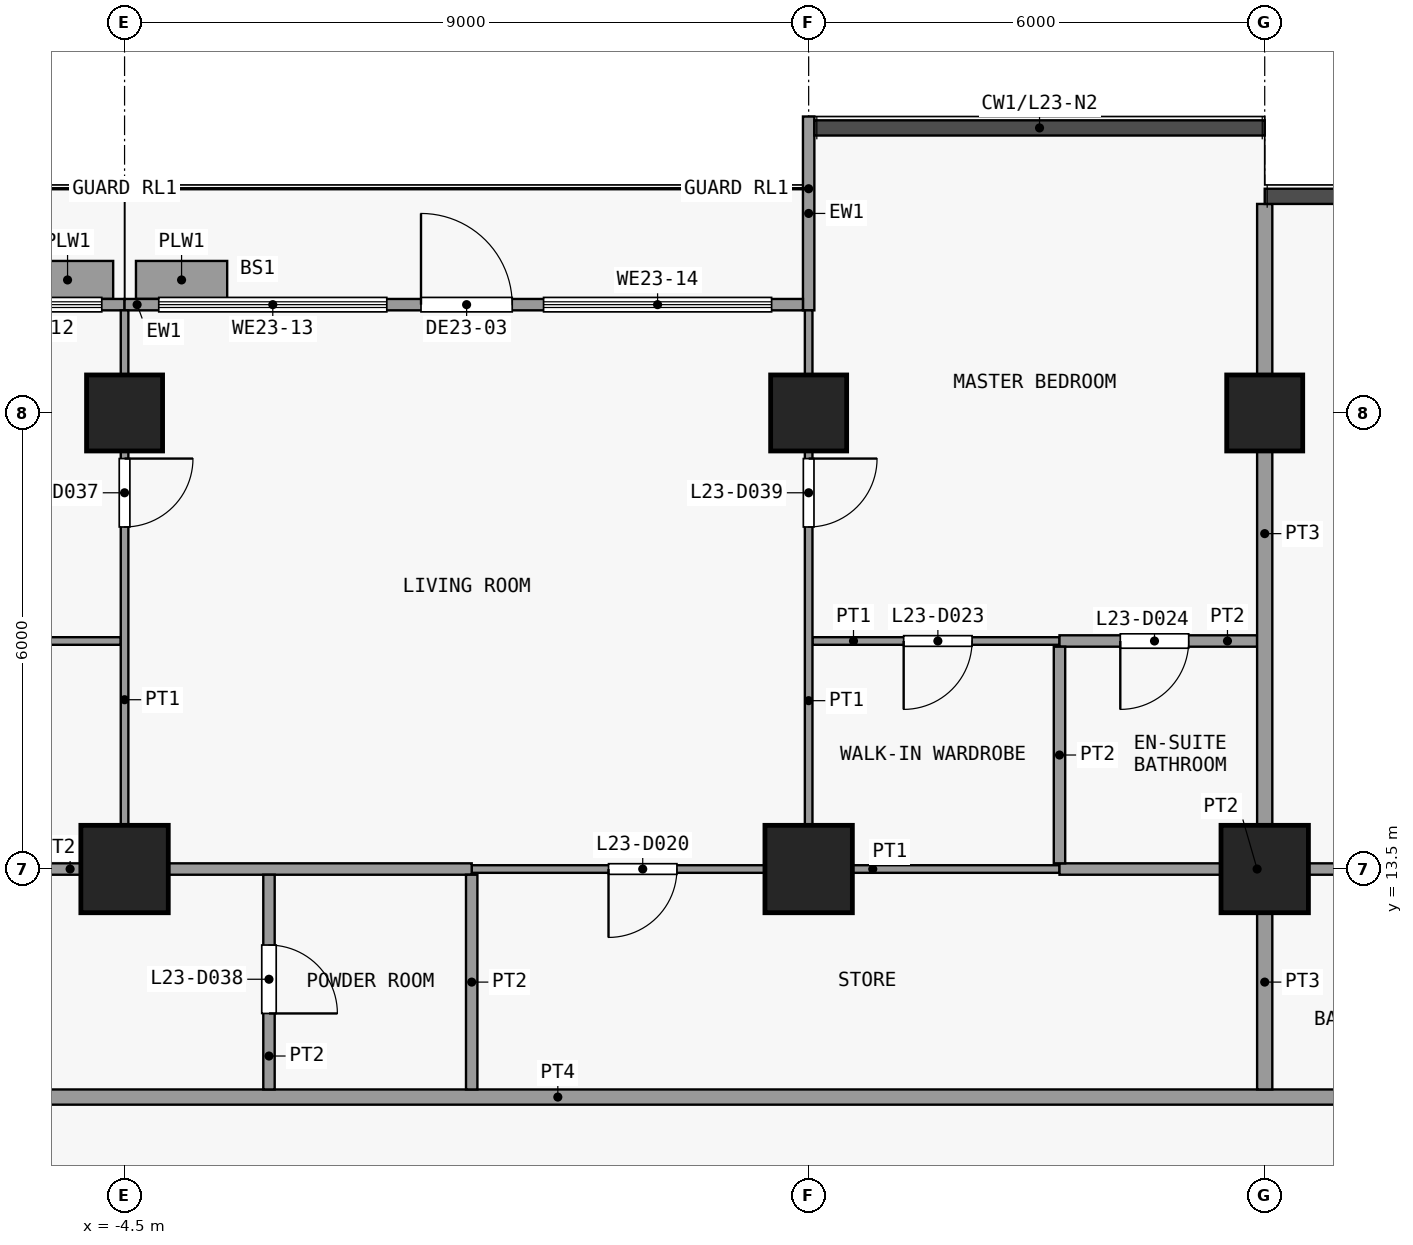
"""IFC4 building model, lengths in metres.
Left out: names, types, materials, properties, quantities, classifications, styles, units other than length and angle.
Written with IfcOpenShell. Run it as: python <this file> out.ifc"""

import sys

from ifc_helpers import new_model, si_unit, direction, frame, frame_2d, origin, origin_2d, place, context, subcontext, project, spatial, rectangle, extrude, element, fill, save


model = new_model("IFC4")
c1 = context("Model", 3, precision=1e-05, world=origin(), true_north=direction((0.0, 1.0)))
c2 = subcontext(c1, "Body", "Model", "MODEL_VIEW")
j1 = project(units=[si_unit("LENGTHUNIT", "METRE"), si_unit("PLANEANGLEUNIT", "RADIAN")], contexts=[c1])
p1 = place(None, origin())
s1 = spatial("IfcSite", under=j1, at=p1, CompositionType="ELEMENT")
p2 = place(p1, origin())
s2 = spatial("IfcBuilding", under=s1, at=p2, CompositionType="ELEMENT")
p3 = place(p2, frame((0.0, 0.0, 95.5)))
s3 = spatial("IfcBuildingStorey", under=s2, at=p3, CompositionType="ELEMENT", Elevation=95.5)
p4 = place(p3, frame((-4.5, 13.5, 0.0), z_axis=(0.0, 0.0, 1.0), x_axis=(1.0, 0.0, 0.0)))
e1 = element("IfcColumn", 1, at=p4, inside=s3, PredefinedType="COLUMN", context=c2, shape_type="SweptSolid", body=[
    extrude(rectangle(XDim=1.15, YDim=1.15, at=origin_2d()), origin(), (0.0, 0.0, 1.0), 3.6),
])
p5 = place(p3, frame((-4.5, 19.5, 0.0), z_axis=(0.0, 0.0, 1.0), x_axis=(1.0, 0.0, 0.0)))
e2 = element("IfcColumn", 2, at=p5, inside=s3, PredefinedType="COLUMN", context=c2, shape_type="SweptSolid", body=[
    extrude(rectangle(XDim=1.0, YDim=1.0, at=origin_2d()), origin(), (0.0, 0.0, 1.0), 3.6),
])
p6 = place(p3, frame((4.5, 13.5, 0.0), z_axis=(0.0, 0.0, 1.0), x_axis=(1.0, 0.0, 0.0)))
e3 = element("IfcColumn", 3, at=p6, inside=s3, PredefinedType="COLUMN", context=c2, shape_type="SweptSolid", body=[
    extrude(rectangle(XDim=1.15, YDim=1.15, at=origin_2d()), origin(), (0.0, 0.0, 1.0), 3.6),
])
p7 = place(p3, frame((4.5, 19.5, 0.0), z_axis=(0.0, 0.0, 1.0), x_axis=(1.0, 0.0, 0.0)))
e4 = element("IfcColumn", 4, at=p7, inside=s3, PredefinedType="COLUMN", context=c2, shape_type="SweptSolid", body=[
    extrude(rectangle(XDim=1.0, YDim=1.0, at=origin_2d()), origin(), (0.0, 0.0, 1.0), 3.6),
])
p8 = place(p3, frame((10.5, 13.5, 0.0), z_axis=(0.0, 0.0, 1.0), x_axis=(1.0, 0.0, 0.0)))
e5 = element("IfcColumn", 5, at=p8, inside=s3, PredefinedType="COLUMN", context=c2, shape_type="SweptSolid", body=[
    extrude(rectangle(XDim=1.15, YDim=1.15, at=origin_2d()), origin(), (0.0, 0.0, 1.0), 3.6),
])
p9 = place(p3, frame((10.5, 19.5, 0.0), z_axis=(0.0, 0.0, 1.0), x_axis=(1.0, 0.0, 0.0)))
e6 = element("IfcColumn", 6, at=p9, inside=s3, PredefinedType="COLUMN", context=c2, shape_type="SweptSolid", body=[
    extrude(rectangle(XDim=1.0, YDim=1.0, at=origin_2d()), origin(), (0.0, 0.0, 1.0), 3.6),
])
p10 = place(p3, frame((-10.5, 20.925, 0.0), z_axis=(0.0, 0.0, 1.0), x_axis=(1.0, 0.0, 0.0)))
e7 = element("IfcWall", 7, at=p10, inside=s3, PredefinedType="SOLIDWALL", context=c2, shape_type="SweptSolid", body=[
    extrude(rectangle(XDim=6.0, YDim=0.15, at=frame_2d((3.0, 0.0))), origin(), (0.0, 0.0, 1.0), 3.3),
])
p11 = place(p10, frame((2.4, 0.0, 0.0)))
e8 = element("IfcOpeningElement", 8, at=p11, cuts=e7, PredefinedType="OPENING", context=c2, shape_type="SweptSolid", body=[
    extrude(rectangle(XDim=1.2, YDim=2.4, at=frame_2d((0.6, 1.2))), frame((0.0, 0.085, 0.0), z_axis=(0.0, -1.0, 0.0), x_axis=(1.0, 0.0, 0.0)), (0.0, 0.0, 1.0), 0.17),
])
p12 = place(p10, frame((0.3, 0.0, 0.9)))
e9 = element("IfcOpeningElement", 9, at=p12, cuts=e7, PredefinedType="OPENING", context=c2, shape_type="SweptSolid", body=[
    extrude(rectangle(XDim=1.8, YDim=2.1, at=frame_2d((0.9, 1.05))), frame((0.0, 0.085, 0.0), z_axis=(0.0, -1.0, 0.0), x_axis=(1.0, 0.0, 0.0)), (0.0, 0.0, 1.0), 0.17),
])
p13 = place(p10, frame((3.9, 0.0, 0.9)))
e10 = element("IfcOpeningElement", 10, at=p13, cuts=e7, PredefinedType="OPENING", context=c2, shape_type="SweptSolid", body=[
    extrude(rectangle(XDim=1.8, YDim=2.1, at=frame_2d((0.9, 1.05))), frame((0.0, 0.085, 0.0), z_axis=(0.0, -1.0, 0.0), x_axis=(1.0, 0.0, 0.0)), (0.0, 0.0, 1.0), 0.17),
])
p14 = place(p3, frame((-5.85, 21.25, 0.0), z_axis=(0.0, 0.0, 1.0), x_axis=(1.0, 0.0, 0.0)))
e11 = element("IfcWall", 11, at=p14, inside=s3, PredefinedType="USERDEFINED", context=c2, shape_type="SweptSolid", body=[
    extrude(rectangle(XDim=1.2, YDim=0.5, at=frame_2d((0.6, 0.0))), origin(), (0.0, 0.0, 1.0), 0.9),
])
p15 = place(p3, frame((4.5, 20.85, 0.0), z_axis=(0.0, 0.0, 1.0), x_axis=(0.0, 1.0, 0.0)))
e12 = element("IfcWall", 12, at=p15, inside=s3, PredefinedType="SOLIDWALL", context=c2, shape_type="SweptSolid", body=[
    extrude(rectangle(XDim=2.55, YDim=0.15, at=frame_2d((1.275, 0.0))), origin(), (0.0, 0.0, 1.0), 3.3),
])
p16 = place(p3, frame((-4.5, 20.925, 0.0), z_axis=(0.0, 0.0, 1.0), x_axis=(1.0, 0.0, 0.0)))
e13 = element("IfcWall", 13, at=p16, inside=s3, PredefinedType="SOLIDWALL", context=c2, shape_type="SweptSolid", body=[
    extrude(rectangle(XDim=8.925, YDim=0.15, at=frame_2d((4.462, 0.0))), origin(), (0.0, 0.0, 1.0), 3.3),
])
p17 = place(p16, frame((3.9, 0.0, 0.0)))
e14 = element("IfcOpeningElement", 14, at=p17, cuts=e13, PredefinedType="OPENING", context=c2, shape_type="SweptSolid", body=[
    extrude(rectangle(XDim=1.2, YDim=2.4, at=frame_2d((0.6, 1.2))), frame((0.0, 0.085, 0.0), z_axis=(0.0, -1.0, 0.0), x_axis=(1.0, 0.0, 0.0)), (0.0, 0.0, 1.0), 0.17),
])
p18 = place(p16, frame((0.45, 0.0, 0.9)))
e15 = element("IfcOpeningElement", 15, at=p18, cuts=e13, PredefinedType="OPENING", context=c2, shape_type="SweptSolid", body=[
    extrude(rectangle(XDim=3.0, YDim=2.1, at=frame_2d((1.5, 1.05))), frame((0.0, 0.085, 0.0), z_axis=(0.0, -1.0, 0.0), x_axis=(1.0, 0.0, 0.0)), (0.0, 0.0, 1.0), 0.17),
])
p19 = place(p16, frame((5.512, 0.0, 0.9)))
e16 = element("IfcOpeningElement", 16, at=p19, cuts=e13, PredefinedType="OPENING", context=c2, shape_type="SweptSolid", body=[
    extrude(rectangle(XDim=3.0, YDim=2.1, at=frame_2d((1.5, 1.05))), frame((0.0, 0.085, 0.0), z_axis=(0.0, -1.0, 0.0), x_axis=(1.0, 0.0, 0.0)), (0.0, 0.0, 1.0), 0.17),
])
p20 = place(p3, frame((-4.35, 21.25, 0.0), z_axis=(0.0, 0.0, 1.0), x_axis=(1.0, 0.0, 0.0)))
e17 = element("IfcWall", 17, at=p20, inside=s3, PredefinedType="USERDEFINED", context=c2, shape_type="SweptSolid", body=[
    extrude(rectangle(XDim=1.2, YDim=0.5, at=frame_2d((0.6, 0.0))), origin(), (0.0, 0.0, 1.0), 0.9),
])
p21 = place(p3, frame((-23.85, 10.5, 0.0), z_axis=(0.0, 0.0, 1.0), x_axis=(1.0, 0.0, 0.0)))
e18 = element("IfcWall", 18, at=p21, inside=s3, PredefinedType="PARTITIONING", context=c2, shape_type="SweptSolid", body=[
    extrude(rectangle(XDim=47.7, YDim=0.2, at=frame_2d((23.85, 0.0))), origin(), (0.0, 0.0, 1.0), 3.3),
])
p22 = place(p21, frame((3.05, 0.0, 0.0)))
e19 = element("IfcOpeningElement", 19, at=p22, cuts=e18, PredefinedType="OPENING", context=c2, shape_type="SweptSolid", body=[
    extrude(rectangle(XDim=1.0, YDim=2.1, at=frame_2d((0.5, 1.05))), frame((0.0, 0.11, 0.0), z_axis=(0.0, -1.0, 0.0), x_axis=(1.0, 0.0, 0.0)), (0.0, 0.0, 1.0), 0.22),
])
p23 = place(p21, frame((11.55, 0.0, 0.0)))
e20 = element("IfcOpeningElement", 20, at=p23, cuts=e18, PredefinedType="OPENING", context=c2, shape_type="SweptSolid", body=[
    extrude(rectangle(XDim=1.0, YDim=2.1, at=frame_2d((0.5, 1.05))), frame((0.0, 0.11, 0.0), z_axis=(0.0, -1.0, 0.0), x_axis=(1.0, 0.0, 0.0)), (0.0, 0.0, 1.0), 0.22),
])
p24 = place(p21, frame((37.55, 0.0, 0.0)))
e21 = element("IfcOpeningElement", 21, at=p24, cuts=e18, PredefinedType="OPENING", context=c2, shape_type="SweptSolid", body=[
    extrude(rectangle(XDim=1.0, YDim=2.1, at=frame_2d((0.5, 1.05))), frame((0.0, 0.11, 0.0), z_axis=(0.0, -1.0, 0.0), x_axis=(1.0, 0.0, 0.0)), (0.0, 0.0, 1.0), 0.22),
])
p25 = place(p3, frame((0.067, 13.5, 0.0), z_axis=(0.0, 0.0, 1.0), x_axis=(1.0, 0.0, 0.0)))
e22 = element("IfcWall", 22, at=p25, inside=s3, PredefinedType="PARTITIONING", context=c2, shape_type="SweptSolid", body=[
    extrude(rectangle(XDim=7.733, YDim=0.1, at=frame_2d((3.867, 0.0))), origin(), (0.0, 0.0, 1.0), 3.3),
])
p26 = place(p25, frame((1.8, 0.0, 0.0)))
e23 = element("IfcOpeningElement", 23, at=p26, cuts=e22, PredefinedType="OPENING", context=c2, shape_type="SweptSolid", body=[
    extrude(rectangle(XDim=0.9, YDim=2.1, at=frame_2d((0.45, 1.05))), frame((0.0, 0.06, 0.0), z_axis=(0.0, -1.0, 0.0), x_axis=(1.0, 0.0, 0.0)), (0.0, 0.0, 1.0), 0.12),
])
p27 = place(p3, frame((-10.5, 13.5, 0.0), z_axis=(0.0, 0.0, 1.0), x_axis=(1.0, 0.0, 0.0)))
e24 = element("IfcWall", 24, at=p27, inside=s3, PredefinedType="PARTITIONING", context=c2, shape_type="SweptSolid", body=[
    extrude(rectangle(XDim=10.567, YDim=0.15, at=frame_2d((5.283, 0.0))), origin(), (0.0, 0.0, 1.0), 3.3),
])
p28 = place(p3, frame((7.8, 13.5, 0.0), z_axis=(0.0, 0.0, 1.0), x_axis=(1.0, 0.0, 0.0)))
e25 = element("IfcWall", 25, at=p28, inside=s3, PredefinedType="PARTITIONING", context=c2, shape_type="SweptSolid", body=[
    extrude(rectangle(XDim=5.2, YDim=0.15, at=frame_2d((2.6, 0.0))), origin(), (0.0, 0.0, 1.0), 3.3),
])
p29 = place(p3, frame((-10.45, 16.5, 0.0), z_axis=(0.0, 0.0, 1.0), x_axis=(1.0, 0.0, 0.0)))
e26 = element("IfcWall", 26, at=p29, inside=s3, PredefinedType="PARTITIONING", context=c2, shape_type="SweptSolid", body=[
    extrude(rectangle(XDim=5.9, YDim=0.1, at=frame_2d((2.95, 0.0))), origin(), (0.0, 0.0, 1.0), 3.3),
])
p30 = place(p29, frame((2.5, 0.0, 0.0)))
e27 = element("IfcOpeningElement", 27, at=p30, cuts=e26, PredefinedType="OPENING", context=c2, shape_type="SweptSolid", body=[
    extrude(rectangle(XDim=0.9, YDim=2.1, at=frame_2d((0.45, 1.05))), frame((0.0, 0.06, 0.0), z_axis=(0.0, -1.0, 0.0), x_axis=(1.0, 0.0, 0.0)), (0.0, 0.0, 1.0), 0.12),
])
p31 = place(p3, frame((4.55, 16.5, 0.0), z_axis=(0.0, 0.0, 1.0), x_axis=(1.0, 0.0, 0.0)))
e28 = element("IfcWall", 28, at=p31, inside=s3, PredefinedType="PARTITIONING", context=c2, shape_type="SweptSolid", body=[
    extrude(rectangle(XDim=3.25, YDim=0.1, at=frame_2d((1.625, 0.0))), origin(), (0.0, 0.0, 1.0), 3.3),
])
p32 = place(p31, frame((1.2, 0.0, 0.0)))
e29 = element("IfcOpeningElement", 29, at=p32, cuts=e28, PredefinedType="OPENING", context=c2, shape_type="SweptSolid", body=[
    extrude(rectangle(XDim=0.9, YDim=2.1, at=frame_2d((0.45, 1.05))), frame((0.0, 0.06, 0.0), z_axis=(0.0, -1.0, 0.0), x_axis=(1.0, 0.0, 0.0)), (0.0, 0.0, 1.0), 0.12),
])
p33 = place(p3, frame((7.8, 16.5, 0.0), z_axis=(0.0, 0.0, 1.0), x_axis=(1.0, 0.0, 0.0)))
e30 = element("IfcWall", 30, at=p33, inside=s3, PredefinedType="PARTITIONING", context=c2, shape_type="SweptSolid", body=[
    extrude(rectangle(XDim=2.6, YDim=0.15, at=frame_2d((1.3, 0.0))), origin(), (0.0, 0.0, 1.0), 3.3),
])
p34 = place(p33, frame((0.8, 0.0, 0.0)))
e31 = element("IfcOpeningElement", 31, at=p34, cuts=e30, PredefinedType="OPENING", context=c2, shape_type="SweptSolid", body=[
    extrude(rectangle(XDim=0.9, YDim=2.1, at=frame_2d((0.45, 1.05))), frame((0.0, 0.085, 0.0), z_axis=(0.0, -1.0, 0.0), x_axis=(1.0, 0.0, 0.0)), (0.0, 0.0, 1.0), 0.17),
])
p35 = place(p3, frame((-4.5, 13.575, 0.0), z_axis=(0.0, 0.0, 1.0), x_axis=(0.0, 1.0, 0.0)))
e32 = element("IfcWall", 32, at=p35, inside=s3, PredefinedType="PARTITIONING", context=c2, shape_type="SweptSolid", body=[
    extrude(rectangle(XDim=7.275, YDim=0.1, at=frame_2d((3.638, 0.0))), origin(), (0.0, 0.0, 1.0), 3.3),
])
p36 = place(p35, frame((4.425, 0.0, 0.0)))
e33 = element("IfcOpeningElement", 33, at=p36, cuts=e32, PredefinedType="OPENING", context=c2, shape_type="SweptSolid", body=[
    extrude(rectangle(XDim=0.9, YDim=2.1, at=frame_2d((0.45, 1.05))), frame((0.0, 0.06, 0.0), z_axis=(0.0, -1.0, 0.0), x_axis=(1.0, 0.0, 0.0)), (0.0, 0.0, 1.0), 0.12),
])
p37 = place(p3, frame((-2.6, 10.6, 0.0), z_axis=(0.0, 0.0, 1.0), x_axis=(0.0, 1.0, 0.0)))
e34 = element("IfcWall", 34, at=p37, inside=s3, PredefinedType="PARTITIONING", context=c2, shape_type="SweptSolid", body=[
    extrude(rectangle(XDim=2.825, YDim=0.15, at=frame_2d((1.413, 0.0))), origin(), (0.0, 0.0, 1.0), 3.3),
])
p38 = place(p37, frame((1.0, 0.0, 0.0)))
e35 = element("IfcOpeningElement", 35, at=p38, cuts=e34, PredefinedType="OPENING", context=c2, shape_type="SweptSolid", body=[
    extrude(rectangle(XDim=0.9, YDim=2.1, at=frame_2d((0.45, 1.05))), frame((0.0, 0.085, 0.0), z_axis=(0.0, -1.0, 0.0), x_axis=(1.0, 0.0, 0.0)), (0.0, 0.0, 1.0), 0.17),
])
p39 = place(p3, frame((0.067, 10.6, 0.0), z_axis=(0.0, 0.0, 1.0), x_axis=(0.0, 1.0, 0.0)))
e36 = element("IfcWall", 36, at=p39, inside=s3, PredefinedType="PARTITIONING", context=c2, shape_type="SweptSolid", body=[
    extrude(rectangle(XDim=2.825, YDim=0.15, at=frame_2d((1.413, 0.0))), origin(), (0.0, 0.0, 1.0), 3.3),
])
p40 = place(p3, frame((4.5, 13.55, 0.0), z_axis=(0.0, 0.0, 1.0), x_axis=(0.0, 1.0, 0.0)))
e37 = element("IfcWall", 37, at=p40, inside=s3, PredefinedType="PARTITIONING", context=c2, shape_type="SweptSolid", body=[
    extrude(rectangle(XDim=7.3, YDim=0.1, at=frame_2d((3.65, 0.0))), origin(), (0.0, 0.0, 1.0), 3.3),
])
p41 = place(p40, frame((4.45, 0.0, 0.0)))
e38 = element("IfcOpeningElement", 38, at=p41, cuts=e37, PredefinedType="OPENING", context=c2, shape_type="SweptSolid", body=[
    extrude(rectangle(XDim=0.9, YDim=2.1, at=frame_2d((0.45, 1.05))), frame((0.0, 0.06, 0.0), z_axis=(0.0, -1.0, 0.0), x_axis=(1.0, 0.0, 0.0)), (0.0, 0.0, 1.0), 0.12),
])
p42 = place(p3, frame((7.8, 13.575, 0.0), z_axis=(0.0, 0.0, 1.0), x_axis=(0.0, 1.0, 0.0)))
e39 = element("IfcWall", 39, at=p42, inside=s3, PredefinedType="PARTITIONING", context=c2, shape_type="SweptSolid", body=[
    extrude(rectangle(XDim=2.85, YDim=0.15, at=frame_2d((1.425, 0.0))), origin(), (0.0, 0.0, 1.0), 3.3),
])
p43 = place(p3, frame((10.5, 10.6, 0.0), z_axis=(0.0, 0.0, 1.0), x_axis=(0.0, 1.0, 0.0)))
e40 = element("IfcWall", 40, at=p43, inside=s3, PredefinedType="PARTITIONING", context=c2, shape_type="SweptSolid", body=[
    extrude(rectangle(XDim=2.825, YDim=0.2, at=frame_2d((1.413, 0.0))), origin(), (0.0, 0.0, 1.0), 3.3),
])
p44 = place(p3, frame((10.5, 13.575, 0.0), z_axis=(0.0, 0.0, 1.0), x_axis=(0.0, 1.0, 0.0)))
e41 = element("IfcWall", 41, at=p44, inside=s3, PredefinedType="PARTITIONING", context=c2, shape_type="SweptSolid", body=[
    extrude(rectangle(XDim=8.675, YDim=0.2, at=frame_2d((4.337, 0.0))), origin(), (0.0, 0.0, 1.0), 3.3),
])
p45 = place(p13, origin())
e42 = element("IfcWindow", 42, at=p45, inside=s3, PartitioningType="SINGLE_PANEL", PredefinedType="WINDOW", context=c2, shape_type="SweptSolid", body=[
    extrude(rectangle(XDim=1.8, YDim=2.1, at=frame_2d((0.9, 1.05))), frame((0.0, 0.03, 0.0), z_axis=(0.0, -1.0, 0.0), x_axis=(1.0, 0.0, 0.0)), (0.0, 0.0, 1.0), 0.06),
])
fill(e10, e42)
p46 = place(p17, origin())
e43 = element("IfcDoor", 43, at=p46, inside=s3, OperationType="SINGLE_SWING_LEFT", PredefinedType="DOOR", context=c2, shape_type="SweptSolid", body=[
    extrude(rectangle(XDim=1.2, YDim=2.4, at=frame_2d((0.6, 1.2))), frame((0.0, 0.025, 0.0), z_axis=(0.0, -1.0, 0.0), x_axis=(1.0, 0.0, 0.0)), (0.0, 0.0, 1.0), 0.05),
])
fill(e14, e43)
p47 = place(p18, origin())
e44 = element("IfcWindow", 44, at=p47, inside=s3, PartitioningType="SINGLE_PANEL", PredefinedType="WINDOW", context=c2, shape_type="SweptSolid", body=[
    extrude(rectangle(XDim=3.0, YDim=2.1, at=frame_2d((1.5, 1.05))), frame((0.0, 0.03, 0.0), z_axis=(0.0, -1.0, 0.0), x_axis=(1.0, 0.0, 0.0)), (0.0, 0.0, 1.0), 0.06),
])
fill(e15, e44)
p48 = place(p19, origin())
e45 = element("IfcWindow", 45, at=p48, inside=s3, PartitioningType="SINGLE_PANEL", PredefinedType="WINDOW", context=c2, shape_type="SweptSolid", body=[
    extrude(rectangle(XDim=3.0, YDim=2.1, at=frame_2d((1.5, 1.05))), frame((0.0, 0.03, 0.0), z_axis=(0.0, -1.0, 0.0), x_axis=(1.0, 0.0, 0.0)), (0.0, 0.0, 1.0), 0.06),
])
fill(e16, e45)
p49 = place(p26, origin())
e46 = element("IfcDoor", 46, at=p49, inside=s3, OperationType="SINGLE_SWING_LEFT", PredefinedType="DOOR", context=c2, shape_type="SweptSolid", body=[
    extrude(rectangle(XDim=0.9, YDim=2.1, at=frame_2d((0.45, 1.05))), frame((0.0, 0.025, 0.0), z_axis=(0.0, -1.0, 0.0), x_axis=(1.0, 0.0, 0.0)), (0.0, 0.0, 1.0), 0.05),
])
fill(e23, e46)
p50 = place(p32, origin())
e47 = element("IfcDoor", 47, at=p50, inside=s3, OperationType="SINGLE_SWING_LEFT", PredefinedType="DOOR", context=c2, shape_type="SweptSolid", body=[
    extrude(rectangle(XDim=0.9, YDim=2.1, at=frame_2d((0.45, 1.05))), frame((0.0, 0.025, 0.0), z_axis=(0.0, -1.0, 0.0), x_axis=(1.0, 0.0, 0.0)), (0.0, 0.0, 1.0), 0.05),
])
fill(e29, e47)
p51 = place(p34, origin())
e48 = element("IfcDoor", 48, at=p51, inside=s3, OperationType="SINGLE_SWING_LEFT", PredefinedType="DOOR", context=c2, shape_type="SweptSolid", body=[
    extrude(rectangle(XDim=0.9, YDim=2.1, at=frame_2d((0.45, 1.05))), frame((0.0, 0.025, 0.0), z_axis=(0.0, -1.0, 0.0), x_axis=(1.0, 0.0, 0.0)), (0.0, 0.0, 1.0), 0.05),
])
fill(e31, e48)
p52 = place(p36, origin())
e49 = element("IfcDoor", 49, at=p52, inside=s3, OperationType="SINGLE_SWING_RIGHT", PredefinedType="DOOR", context=c2, shape_type="SweptSolid", body=[
    extrude(rectangle(XDim=0.9, YDim=2.1, at=frame_2d((0.45, 1.05))), frame((0.0, 0.025, 0.0), z_axis=(0.0, -1.0, 0.0), x_axis=(1.0, 0.0, 0.0)), (0.0, 0.0, 1.0), 0.05),
])
fill(e33, e49)
p53 = place(p38, origin())
e50 = element("IfcDoor", 50, at=p53, inside=s3, OperationType="SINGLE_SWING_LEFT", PredefinedType="DOOR", context=c2, shape_type="SweptSolid", body=[
    extrude(rectangle(XDim=0.9, YDim=2.1, at=frame_2d((0.45, 1.05))), frame((0.0, 0.025, 0.0), z_axis=(0.0, -1.0, 0.0), x_axis=(1.0, 0.0, 0.0)), (0.0, 0.0, 1.0), 0.05),
])
fill(e35, e50)
p54 = place(p41, origin())
e51 = element("IfcDoor", 51, at=p54, inside=s3, OperationType="SINGLE_SWING_RIGHT", PredefinedType="DOOR", context=c2, shape_type="SweptSolid", body=[
    extrude(rectangle(XDim=0.9, YDim=2.1, at=frame_2d((0.45, 1.05))), frame((0.0, 0.025, 0.0), z_axis=(0.0, -1.0, 0.0), x_axis=(1.0, 0.0, 0.0)), (0.0, 0.0, 1.0), 0.05),
])
fill(e38, e51)
save(model, sys.argv[1])
